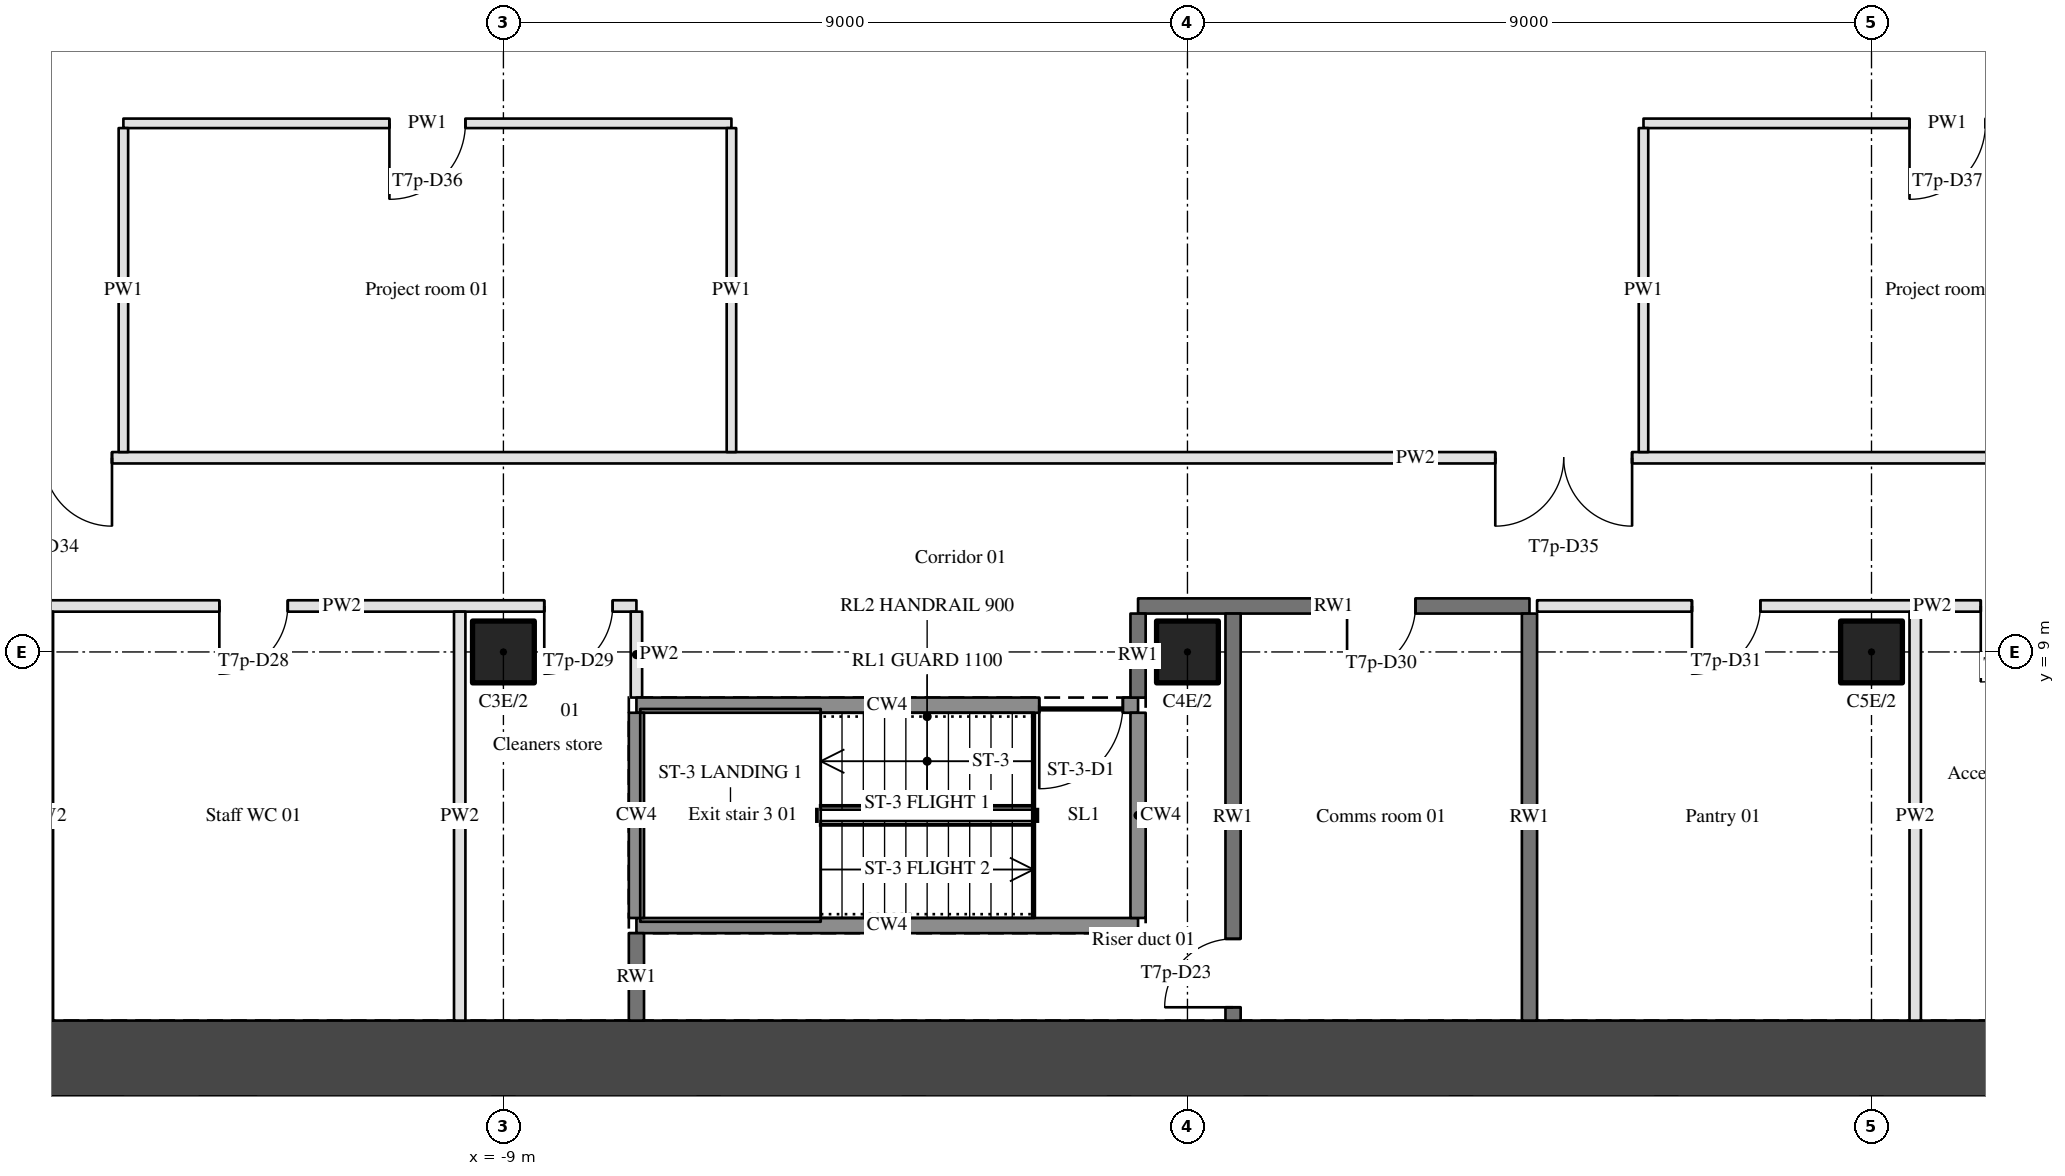
"""IFC4 building model, lengths in metres.
Left out: names, types, materials, properties, quantities, classifications, styles, units other than length and angle.
Written with IfcOpenShell. Run it as: python <this file> out.ifc"""

import sys

from ifc_helpers import new_model, si_unit, direction, frame, frame_2d, origin, origin_2d, place, context, subcontext, project, spatial, rectangle, hollow_circle, extrude, element, fill, save


model = new_model("IFC4")
c1 = context("Model", 3, precision=1e-05, world=origin(), true_north=direction((0.0, 1.0)))
c2 = subcontext(c1, "Body", "Model", "MODEL_VIEW")
j1 = project(units=[si_unit("LENGTHUNIT", "METRE"), si_unit("PLANEANGLEUNIT", "RADIAN")], contexts=[c1])
p1 = place(None, origin())
s1 = spatial("IfcSite", under=j1, at=p1, CompositionType="ELEMENT")
p2 = place(p1, origin())
s2 = spatial("IfcBuilding", under=s1, at=p2, CompositionType="ELEMENT")
p3 = place(p2, frame((0.0, 0.0, 105.0)))
s3 = spatial("IfcBuildingStorey", under=s2, at=p3, CompositionType="ELEMENT", Elevation=105.0)
for number, where, z_axis, x_axis in (
    (1, (-9.0, 9.0, 0.0), (0.0, 0.0, 1.0), (1.0, 0.0, 0.0)),
    (2, (0.0, 9.0, 0.0), (0.0, 0.0, 1.0), (1.0, 0.0, 0.0)),
    (3, (9.0, 9.0, 0.0), (0.0, 0.0, 1.0), (1.0, 0.0, 0.0)),
):
    element("IfcColumn", number, at=place(p3, frame(where, z_axis=z_axis, x_axis=x_axis)), inside=s3, PredefinedType="COLUMN", context=c2, shape_type="SweptSolid", body=[
        extrude(hollow_circle(Radius=0.406, WallThickness=0.036, at=origin_2d()), origin(), (0.0, 0.0, 1.0), 3.9),
    ])
p4 = place(p3, frame((-15.0, 3.65, 0.0), z_axis=(0.0, 0.0, 1.0), x_axis=(1.0, 0.0, 0.0)))
e4 = element("IfcWall", 4, at=p4, inside=s3, PredefinedType="SHEAR", context=c2, shape_type="SweptSolid", body=[
    extrude(rectangle(XDim=30.0, YDim=1.0, at=frame_2d((15.0, 0.0))), origin(), (0.0, 0.0, 1.0), 3.9),
])
p5 = place(p3, frame((-7.25, 5.4, 0.0), z_axis=(0.0, 0.0, 1.0), x_axis=(1.0, 0.0, 0.0)))
e5 = element("IfcWall", 5, at=p5, inside=s3, PredefinedType="SHEAR", context=c2, shape_type="SweptSolid", body=[
    extrude(rectangle(XDim=6.6, YDim=0.2, at=frame_2d((3.3, 0.0))), origin(), (0.0, 0.0, 1.0), 3.9),
])
p6 = place(p3, frame((-0.65, 8.3, 0.0), z_axis=(0.0, 0.0, 1.0), x_axis=(-1.0, 0.0, 0.0)))
e6 = element("IfcWall", 6, at=p6, inside=s3, PredefinedType="SHEAR", context=c2, shape_type="SweptSolid", body=[
    extrude(rectangle(XDim=6.6, YDim=0.2, at=frame_2d((3.3, 0.0))), origin(), (0.0, 0.0, 1.0), 3.9),
])
p7 = place(p6, frame((0.2, 0.0, 0.0)))
e7 = element("IfcOpeningElement", 7, at=p7, cuts=e6, PredefinedType="OPENING", context=c2, shape_type="SweptSolid", body=[
    extrude(rectangle(XDim=1.1, YDim=2.1, at=frame_2d((0.55, 1.05))), frame((0.0, 0.11, 0.0), z_axis=(0.0, -1.0, 0.0), x_axis=(1.0, 0.0, 0.0)), (0.0, 0.0, 1.0), 0.22),
])
p8 = place(p3, frame((-7.25, 9.605, 0.0), z_axis=(0.0, 0.0, 1.0), x_axis=(-1.0, 0.0, 0.0)))
e8 = element("IfcWall", 8, at=p8, inside=s3, PredefinedType="PARTITIONING", context=c2, shape_type="SweptSolid", body=[
    extrude(rectangle(XDim=7.75, YDim=0.15, at=frame_2d((3.875, 0.0))), origin(), (0.0, 0.0, 1.0), 2.96),
])
p9 = place(p8, frame((0.312, 0.0, 0.0)))
e9 = element("IfcOpeningElement", 9, at=p9, cuts=e8, PredefinedType="OPENING", context=c2, shape_type="SweptSolid", body=[
    extrude(rectangle(XDim=0.9, YDim=2.1, at=frame_2d((0.45, 1.05))), frame((0.0, 0.085, 0.0), z_axis=(0.0, -1.0, 0.0), x_axis=(1.0, 0.0, 0.0)), (0.0, 0.0, 1.0), 0.17),
])
p10 = place(p8, frame((4.587, 0.0, 0.0)))
e10 = element("IfcOpeningElement", 10, at=p10, cuts=e8, PredefinedType="OPENING", context=c2, shape_type="SweptSolid", body=[
    extrude(rectangle(XDim=0.9, YDim=2.1, at=frame_2d((0.45, 1.05))), frame((0.0, 0.085, 0.0), z_axis=(0.0, -1.0, 0.0), x_axis=(1.0, 0.0, 0.0)), (0.0, 0.0, 1.0), 0.17),
])
p11 = place(p3, frame((4.5, 9.605, 0.0), z_axis=(0.0, 0.0, 1.0), x_axis=(-1.0, 0.0, 0.0)))
e11 = element("IfcWall", 11, at=p11, inside=s3, PredefinedType="SOLIDWALL", context=c2, shape_type="SweptSolid", body=[
    extrude(rectangle(XDim=5.15, YDim=0.2, at=frame_2d((2.575, 0.0))), origin(), (0.0, 0.0, 1.0), 2.96),
])
p12 = place(p11, frame((1.5, 0.0, 0.0)))
e12 = element("IfcOpeningElement", 12, at=p12, cuts=e11, PredefinedType="OPENING", context=c2, shape_type="SweptSolid", body=[
    extrude(rectangle(XDim=0.9, YDim=2.1, at=frame_2d((0.45, 1.05))), frame((0.0, 0.11, 0.0), z_axis=(0.0, -1.0, 0.0), x_axis=(1.0, 0.0, 0.0)), (0.0, 0.0, 1.0), 0.22),
])
p13 = place(p3, frame((15.0, 9.605, 0.0), z_axis=(0.0, 0.0, 1.0), x_axis=(-1.0, 0.0, 0.0)))
e13 = element("IfcWall", 13, at=p13, inside=s3, PredefinedType="PARTITIONING", context=c2, shape_type="SweptSolid", body=[
    extrude(rectangle(XDim=10.4, YDim=0.15, at=frame_2d((5.2, 0.0))), origin(), (0.0, 0.0, 1.0), 2.96),
])
p14 = place(p13, frame((0.9, 0.0, 0.0)))
e14 = element("IfcOpeningElement", 14, at=p14, cuts=e13, PredefinedType="OPENING", context=c2, shape_type="SweptSolid", body=[
    extrude(rectangle(XDim=0.9, YDim=2.1, at=frame_2d((0.45, 1.05))), frame((0.0, 0.085, 0.0), z_axis=(0.0, -1.0, 0.0), x_axis=(1.0, 0.0, 0.0)), (0.0, 0.0, 1.0), 0.17),
])
p15 = place(p13, frame((7.462, 0.0, 0.0)))
e15 = element("IfcOpeningElement", 15, at=p15, cuts=e13, PredefinedType="OPENING", context=c2, shape_type="SweptSolid", body=[
    extrude(rectangle(XDim=0.9, YDim=2.1, at=frame_2d((0.45, 1.05))), frame((0.0, 0.085, 0.0), z_axis=(0.0, -1.0, 0.0), x_axis=(1.0, 0.0, 0.0)), (0.0, 0.0, 1.0), 0.17),
])
p16 = place(p13, frame((3.562, 0.0, 0.0)))
e16 = element("IfcOpeningElement", 16, at=p16, cuts=e13, PredefinedType="OPENING", context=c2, shape_type="SweptSolid", body=[
    extrude(rectangle(XDim=1.0, YDim=2.1, at=frame_2d((0.5, 1.05))), frame((0.0, 0.085, 0.0), z_axis=(0.0, -1.0, 0.0), x_axis=(1.0, 0.0, 0.0)), (0.0, 0.0, 1.0), 0.17),
])
p17 = place(p3, frame((26.865, 11.555, 0.0), z_axis=(0.0, 0.0, 1.0), x_axis=(-1.0, 0.0, 0.0)))
e17 = element("IfcWall", 17, at=p17, inside=s3, PredefinedType="PARTITIONING", context=c2, shape_type="SweptSolid", body=[
    extrude(rectangle(XDim=47.73, YDim=0.15, at=frame_2d((23.865, 0.0))), origin(), (0.0, 0.0, 1.0), 2.96),
])
p18 = place(p17, frame((41.015, 0.0, 0.0)))
e18 = element("IfcOpeningElement", 18, at=p18, cuts=e17, PredefinedType="OPENING", context=c2, shape_type="SweptSolid", body=[
    extrude(rectangle(XDim=1.8, YDim=2.1, at=frame_2d((0.9, 1.05))), frame((0.0, 0.085, 0.0), z_axis=(0.0, -1.0, 0.0), x_axis=(1.0, 0.0, 0.0)), (0.0, 0.0, 1.0), 0.17),
])
p19 = place(p17, frame((21.015, 0.0, 0.0)))
e19 = element("IfcOpeningElement", 19, at=p19, cuts=e17, PredefinedType="OPENING", context=c2, shape_type="SweptSolid", body=[
    extrude(rectangle(XDim=1.8, YDim=2.1, at=frame_2d((0.9, 1.05))), frame((0.0, 0.085, 0.0), z_axis=(0.0, -1.0, 0.0), x_axis=(1.0, 0.0, 0.0)), (0.0, 0.0, 1.0), 0.17),
])
p20 = place(p3, frame((-6.0, 15.955, 0.0), z_axis=(0.0, 0.0, 1.0), x_axis=(-1.0, 0.0, 0.0)))
e20 = element("IfcWall", 20, at=p20, inside=s3, PredefinedType="PARTITIONING", context=c2, shape_type="SweptSolid", body=[
    extrude(rectangle(XDim=8.0, YDim=0.125, at=frame_2d((4.0, 0.0))), origin(), (0.0, 0.0, 1.0), 2.96),
])
p21 = place(p20, frame((3.5, 0.0, 0.0)))
e21 = element("IfcOpeningElement", 21, at=p21, cuts=e20, PredefinedType="OPENING", context=c2, shape_type="SweptSolid", body=[
    extrude(rectangle(XDim=1.0, YDim=2.1, at=frame_2d((0.5, 1.05))), frame((0.0, 0.073, 0.0), z_axis=(0.0, -1.0, 0.0), x_axis=(1.0, 0.0, 0.0)), (0.0, 0.0, 1.0), 0.145),
])
p22 = place(p3, frame((14.0, 15.955, 0.0), z_axis=(0.0, 0.0, 1.0), x_axis=(-1.0, 0.0, 0.0)))
e22 = element("IfcWall", 22, at=p22, inside=s3, PredefinedType="PARTITIONING", context=c2, shape_type="SweptSolid", body=[
    extrude(rectangle(XDim=8.0, YDim=0.125, at=frame_2d((4.0, 0.0))), origin(), (0.0, 0.0, 1.0), 2.96),
])
p23 = place(p22, frame((3.5, 0.0, 0.0)))
e23 = element("IfcOpeningElement", 23, at=p23, cuts=e22, PredefinedType="OPENING", context=c2, shape_type="SweptSolid", body=[
    extrude(rectangle(XDim=1.0, YDim=2.1, at=frame_2d((0.5, 1.05))), frame((0.0, 0.073, 0.0), z_axis=(0.0, -1.0, 0.0), x_axis=(1.0, 0.0, 0.0)), (0.0, 0.0, 1.0), 0.145),
])
p24 = place(p3, frame((-15.0, 4.15, 0.0), z_axis=(0.0, 0.0, 1.0), x_axis=(0.0, 1.0, 0.0)))
e24 = element("IfcWall", 24, at=p24, inside=s3, PredefinedType="PARTITIONING", context=c2, shape_type="SweptSolid", body=[
    extrude(rectangle(XDim=5.38, YDim=0.15, at=frame_2d((2.69, 0.0))), origin(), (0.0, 0.0, 1.0), 2.96),
])
p25 = place(p3, frame((-14.0, 11.63, 0.0), z_axis=(0.0, 0.0, 1.0), x_axis=(0.0, 1.0, 0.0)))
e25 = element("IfcWall", 25, at=p25, inside=s3, PredefinedType="PARTITIONING", context=c2, shape_type="SweptSolid", body=[
    extrude(rectangle(XDim=4.263, YDim=0.125, at=frame_2d((2.131, 0.0))), origin(), (0.0, 0.0, 1.0), 2.96),
])
p26 = place(p3, frame((-9.575, 4.15, 0.0), z_axis=(0.0, 0.0, 1.0), x_axis=(0.0, 1.0, 0.0)))
e26 = element("IfcWall", 26, at=p26, inside=s3, PredefinedType="PARTITIONING", context=c2, shape_type="SweptSolid", body=[
    extrude(rectangle(XDim=5.38, YDim=0.15, at=frame_2d((2.69, 0.0))), origin(), (0.0, 0.0, 1.0), 2.96),
])
p27 = place(p3, frame((-7.25, 4.15, 0.0), z_axis=(0.0, 0.0, 1.0), x_axis=(0.0, 1.0, 0.0)))
e27 = element("IfcWall", 27, at=p27, inside=s3, PredefinedType="SOLIDWALL", context=c2, shape_type="SweptSolid", body=[
    extrude(rectangle(XDim=1.15, YDim=0.2, at=frame_2d((0.575, 0.0))), origin(), (0.0, 0.0, 1.0), 2.96),
])
p28 = place(p3, frame((-7.25, 5.5, 0.0), z_axis=(0.0, 0.0, 1.0), x_axis=(0.0, 1.0, 0.0)))
e28 = element("IfcWall", 28, at=p28, inside=s3, PredefinedType="SHEAR", context=c2, shape_type="SweptSolid", body=[
    extrude(rectangle(XDim=2.7, YDim=0.2, at=frame_2d((1.35, 0.0))), origin(), (0.0, 0.0, 1.0), 3.9),
])
p29 = place(p3, frame((-7.25, 8.4, 0.0), z_axis=(0.0, 0.0, 1.0), x_axis=(0.0, 1.0, 0.0)))
e29 = element("IfcWall", 29, at=p29, inside=s3, PredefinedType="PARTITIONING", context=c2, shape_type="SweptSolid", body=[
    extrude(rectangle(XDim=1.13, YDim=0.15, at=frame_2d((0.565, 0.0))), origin(), (0.0, 0.0, 1.0), 2.96),
])
p30 = place(p3, frame((-6.0, 11.63, 0.0), z_axis=(0.0, 0.0, 1.0), x_axis=(0.0, 1.0, 0.0)))
e30 = element("IfcWall", 30, at=p30, inside=s3, PredefinedType="PARTITIONING", context=c2, shape_type="SweptSolid", body=[
    extrude(rectangle(XDim=4.263, YDim=0.125, at=frame_2d((2.131, 0.0))), origin(), (0.0, 0.0, 1.0), 2.96),
])
p31 = place(p3, frame((-0.65, 5.5, 0.0), z_axis=(0.0, 0.0, 1.0), x_axis=(0.0, 1.0, 0.0)))
e31 = element("IfcWall", 31, at=p31, inside=s3, PredefinedType="SHEAR", context=c2, shape_type="SweptSolid", body=[
    extrude(rectangle(XDim=2.7, YDim=0.2, at=frame_2d((1.35, 0.0))), origin(), (0.0, 0.0, 1.0), 3.9),
])
p32 = place(p3, frame((-0.65, 8.4, 0.0), z_axis=(0.0, 0.0, 1.0), x_axis=(0.0, 1.0, 0.0)))
e32 = element("IfcWall", 32, at=p32, inside=s3, PredefinedType="SOLIDWALL", context=c2, shape_type="SweptSolid", body=[
    extrude(rectangle(XDim=1.105, YDim=0.2, at=frame_2d((0.552, 0.0))), origin(), (0.0, 0.0, 1.0), 2.96),
])
p33 = place(p3, frame((0.6, 4.15, 0.0), z_axis=(0.0, 0.0, 1.0), x_axis=(0.0, 1.0, 0.0)))
e33 = element("IfcWall", 33, at=p33, inside=s3, PredefinedType="SOLIDWALL", context=c2, shape_type="SweptSolid", body=[
    extrude(rectangle(XDim=5.355, YDim=0.2, at=frame_2d((2.677, 0.0))), origin(), (0.0, 0.0, 1.0), 2.96),
])
p34 = place(p33, frame((0.175, 0.0, 0.0)))
e34 = element("IfcOpeningElement", 34, at=p34, cuts=e33, PredefinedType="OPENING", context=c2, shape_type="SweptSolid", body=[
    extrude(rectangle(XDim=0.9, YDim=2.1, at=frame_2d((0.45, 1.05))), frame((0.0, 0.11, 0.0), z_axis=(0.0, -1.0, 0.0), x_axis=(1.0, 0.0, 0.0)), (0.0, 0.0, 1.0), 0.22),
])
p35 = place(p3, frame((4.5, 4.15, 0.0), z_axis=(0.0, 0.0, 1.0), x_axis=(0.0, 1.0, 0.0)))
e35 = element("IfcWall", 35, at=p35, inside=s3, PredefinedType="SOLIDWALL", context=c2, shape_type="SweptSolid", body=[
    extrude(rectangle(XDim=5.355, YDim=0.2, at=frame_2d((2.677, 0.0))), origin(), (0.0, 0.0, 1.0), 2.96),
])
p36 = place(p3, frame((6.0, 11.63, 0.0), z_axis=(0.0, 0.0, 1.0), x_axis=(0.0, 1.0, 0.0)))
e36 = element("IfcWall", 36, at=p36, inside=s3, PredefinedType="PARTITIONING", context=c2, shape_type="SweptSolid", body=[
    extrude(rectangle(XDim=4.263, YDim=0.125, at=frame_2d((2.131, 0.0))), origin(), (0.0, 0.0, 1.0), 2.96),
])
p37 = place(p3, frame((9.575, 4.15, 0.0), z_axis=(0.0, 0.0, 1.0), x_axis=(0.0, 1.0, 0.0)))
e37 = element("IfcWall", 37, at=p37, inside=s3, PredefinedType="PARTITIONING", context=c2, shape_type="SweptSolid", body=[
    extrude(rectangle(XDim=5.38, YDim=0.15, at=frame_2d((2.69, 0.0))), origin(), (0.0, 0.0, 1.0), 2.96),
])
p38 = place(p18, origin())
e38 = element("IfcDoor", 38, at=p38, inside=s3, OperationType="DOUBLE_DOOR_SINGLE_SWING", PredefinedType="DOOR", context=c2, shape_type="SweptSolid", body=[
    extrude(rectangle(XDim=1.8, YDim=2.1, at=frame_2d((0.9, 1.05))), frame((0.0, 0.025, 0.0), z_axis=(0.0, -1.0, 0.0), x_axis=(1.0, 0.0, 0.0)), (0.0, 0.0, 1.0), 0.05),
])
fill(e18, e38)
p39 = place(p19, origin())
e39 = element("IfcDoor", 39, at=p39, inside=s3, OperationType="DOUBLE_DOOR_SINGLE_SWING", PredefinedType="DOOR", context=c2, shape_type="SweptSolid", body=[
    extrude(rectangle(XDim=1.8, YDim=2.1, at=frame_2d((0.9, 1.05))), frame((0.0, 0.025, 0.0), z_axis=(0.0, -1.0, 0.0), x_axis=(1.0, 0.0, 0.0)), (0.0, 0.0, 1.0), 0.05),
])
fill(e19, e39)
p40 = place(p7, origin())
e40 = element("IfcDoor", 40, at=p40, inside=s3, OperationType="SINGLE_SWING_RIGHT", PredefinedType="DOOR", context=c2, shape_type="SweptSolid", body=[
    extrude(rectangle(XDim=1.1, YDim=2.1, at=frame_2d((0.55, 1.05))), frame((0.0, 0.025, 0.0), z_axis=(0.0, -1.0, 0.0), x_axis=(1.0, 0.0, 0.0)), (0.0, 0.0, 1.0), 0.05),
])
fill(e7, e40)
p41 = place(p34, origin())
e41 = element("IfcDoor", 41, at=p41, inside=s3, OperationType="SINGLE_SWING_LEFT", PredefinedType="DOOR", context=c2, shape_type="SweptSolid", body=[
    extrude(rectangle(XDim=0.9, YDim=2.1, at=frame_2d((0.45, 1.05))), frame((0.0, 0.025, 0.0), z_axis=(0.0, -1.0, 0.0), x_axis=(1.0, 0.0, 0.0)), (0.0, 0.0, 1.0), 0.05),
])
fill(e34, e41)
p42 = place(p12, origin())
e42 = element("IfcDoor", 42, at=p42, inside=s3, OperationType="SINGLE_SWING_RIGHT", PredefinedType="DOOR", context=c2, shape_type="SweptSolid", body=[
    extrude(rectangle(XDim=0.9, YDim=2.1, at=frame_2d((0.45, 1.05))), frame((0.0, 0.025, 0.0), z_axis=(0.0, -1.0, 0.0), x_axis=(1.0, 0.0, 0.0)), (0.0, 0.0, 1.0), 0.05),
])
fill(e12, e42)
p43 = place(p15, origin())
e43 = element("IfcDoor", 43, at=p43, inside=s3, OperationType="SINGLE_SWING_RIGHT", PredefinedType="DOOR", context=c2, shape_type="SweptSolid", body=[
    extrude(rectangle(XDim=0.9, YDim=2.1, at=frame_2d((0.45, 1.05))), frame((0.0, 0.025, 0.0), z_axis=(0.0, -1.0, 0.0), x_axis=(1.0, 0.0, 0.0)), (0.0, 0.0, 1.0), 0.05),
])
fill(e15, e43)
p44 = place(p9, origin())
e44 = element("IfcDoor", 44, at=p44, inside=s3, OperationType="SINGLE_SWING_RIGHT", PredefinedType="DOOR", context=c2, shape_type="SweptSolid", body=[
    extrude(rectangle(XDim=0.9, YDim=2.1, at=frame_2d((0.45, 1.05))), frame((0.0, 0.025, 0.0), z_axis=(0.0, -1.0, 0.0), x_axis=(1.0, 0.0, 0.0)), (0.0, 0.0, 1.0), 0.05),
])
fill(e9, e44)
p45 = place(p16, origin())
e45 = element("IfcDoor", 45, at=p45, inside=s3, OperationType="SINGLE_SWING_RIGHT", PredefinedType="DOOR", context=c2, shape_type="SweptSolid", body=[
    extrude(rectangle(XDim=1.0, YDim=2.1, at=frame_2d((0.5, 1.05))), frame((0.0, 0.025, 0.0), z_axis=(0.0, -1.0, 0.0), x_axis=(1.0, 0.0, 0.0)), (0.0, 0.0, 1.0), 0.05),
])
fill(e16, e45)
p46 = place(p10, origin())
e46 = element("IfcDoor", 46, at=p46, inside=s3, OperationType="SINGLE_SWING_RIGHT", PredefinedType="DOOR", context=c2, shape_type="SweptSolid", body=[
    extrude(rectangle(XDim=0.9, YDim=2.1, at=frame_2d((0.45, 1.05))), frame((0.0, 0.025, 0.0), z_axis=(0.0, -1.0, 0.0), x_axis=(1.0, 0.0, 0.0)), (0.0, 0.0, 1.0), 0.05),
])
fill(e10, e46)
p47 = place(p21, origin())
e47 = element("IfcDoor", 47, at=p47, inside=s3, OperationType="SINGLE_SWING_RIGHT", PredefinedType="DOOR", context=c2, shape_type="SweptSolid", body=[
    extrude(rectangle(XDim=1.0, YDim=2.1, at=frame_2d((0.5, 1.05))), frame((0.0, 0.025, 0.0), z_axis=(0.0, -1.0, 0.0), x_axis=(1.0, 0.0, 0.0)), (0.0, 0.0, 1.0), 0.05),
])
fill(e21, e47)
p48 = place(p23, origin())
e48 = element("IfcDoor", 48, at=p48, inside=s3, OperationType="SINGLE_SWING_RIGHT", PredefinedType="DOOR", context=c2, shape_type="SweptSolid", body=[
    extrude(rectangle(XDim=1.0, YDim=2.1, at=frame_2d((0.5, 1.05))), frame((0.0, 0.025, 0.0), z_axis=(0.0, -1.0, 0.0), x_axis=(1.0, 0.0, 0.0)), (0.0, 0.0, 1.0), 0.05),
])
fill(e23, e48)
save(model, sys.argv[1])
